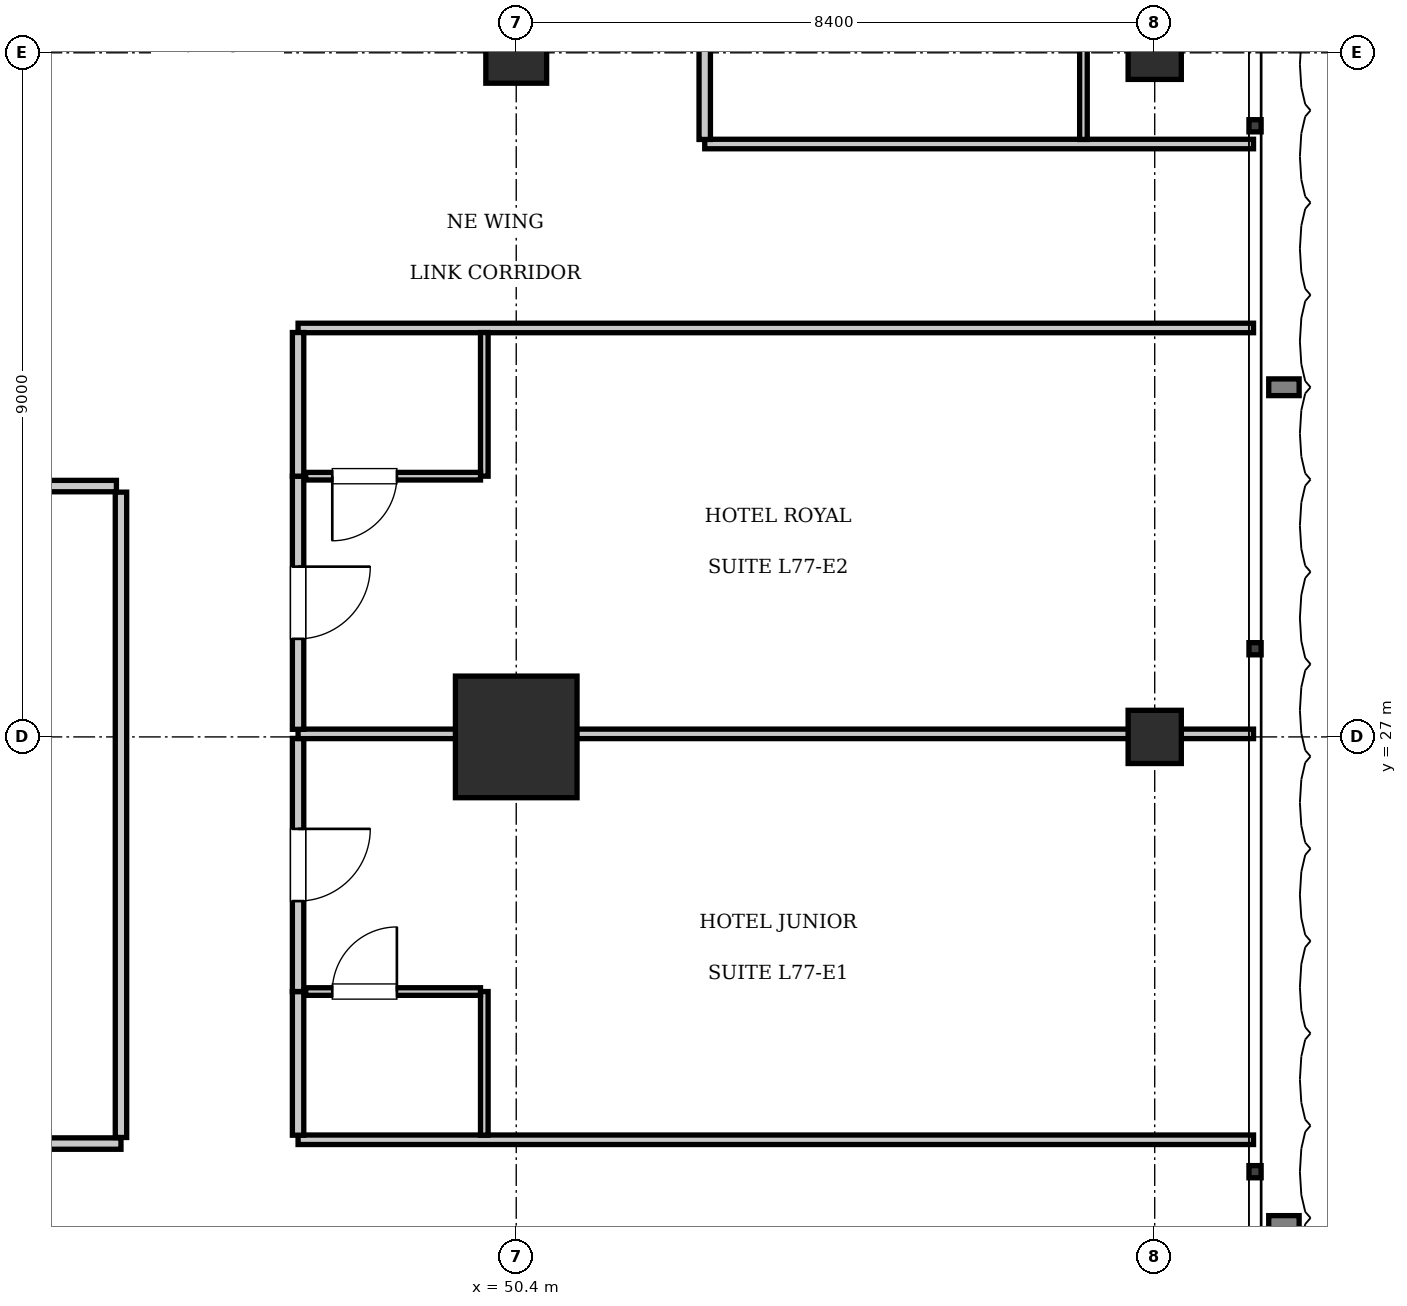
"""IFC4 building model, lengths in metres.
Left out: names, types, materials, properties, quantities, classifications, styles, units other than length and angle.
Written with IfcOpenShell. Run it as: python <this file> out.ifc"""

import sys

from ifc_helpers import new_model, si_unit, direction, frame, frame_2d, origin, origin_2d, place, context, subcontext, project, spatial, rectangle, extrude, element, fill, save


model = new_model("IFC4")
c1 = context("Model", 3, precision=1e-05, world=origin(), true_north=direction((0.0, 1.0)))
c2 = subcontext(c1, "Body", "Model", "MODEL_VIEW")
j1 = project(units=[si_unit("LENGTHUNIT", "METRE"), si_unit("PLANEANGLEUNIT", "RADIAN")], contexts=[c1])
p1 = place(None, origin())
s1 = spatial("IfcSite", under=j1, at=p1, CompositionType="ELEMENT")
p2 = place(p1, origin())
s2 = spatial("IfcBuilding", under=s1, at=p2, CompositionType="ELEMENT")
p3 = place(p2, frame((0.0, 0.0, 312.55)))
s3 = spatial("IfcBuildingStorey", under=s2, at=p3, CompositionType="ELEMENT", Elevation=312.55)
p4 = place(p3, frame((50.4, 27.0, 0.0), z_axis=(0.0, 0.0, 1.0), x_axis=(1.0, 0.0, 0.0)))
e1 = element("IfcColumn", 1, at=p4, inside=s3, PredefinedType="COLUMN", context=c2, shape_type="SweptSolid", body=[
    extrude(rectangle(XDim=1.6, YDim=1.6, at=origin_2d()), origin(), (0.0, 0.0, 1.0), 3.85),
])
p5 = place(p3, frame((50.4, 36.0, 0.0), z_axis=(0.0, 0.0, 1.0), x_axis=(1.0, 0.0, 0.0)))
e2 = element("IfcColumn", 2, at=p5, inside=s3, PredefinedType="COLUMN", context=c2, shape_type="SweptSolid", body=[
    extrude(rectangle(XDim=0.8, YDim=0.8, at=origin_2d()), origin(), (0.0, 0.0, 1.0), 3.85),
])
for number, where, z_axis, x_axis in (
    (3, (58.8, 27.0, 0.0), (0.0, 0.0, 1.0), (1.0, 0.0, 0.0)),
    (4, (58.8, 36.0, 0.0), (0.0, 0.0, 1.0), (1.0, 0.0, 0.0)),
):
    element("IfcColumn", number, at=place(p3, frame(where, z_axis=z_axis, x_axis=x_axis)), inside=s3, PredefinedType="COLUMN", context=c2, shape_type="SweptSolid", body=[
        extrude(rectangle(XDim=0.7, YDim=0.7, at=origin_2d()), origin(), (0.0, 0.0, 1.0), 3.85),
    ])
p6 = place(p3, frame((30.45, 21.65, 0.0), z_axis=(0.0, 0.0, 1.0), x_axis=(1.0, 0.0, 0.0)))
e5 = element("IfcWall", 5, at=p6, inside=s3, PredefinedType="PARTITIONING", context=c2, shape_type="SweptSolid", body=[
    extrude(rectangle(XDim=14.75, YDim=0.15, at=frame_2d((7.375, 0.0))), origin(), (0.0, 0.0, 1.0), 3.55),
])
p7 = place(p3, frame((45.2, 21.73, 0.0), z_axis=(0.0, 0.0, 1.0), x_axis=(0.0, 1.0, 0.0)))
e6 = element("IfcWall", 6, at=p7, inside=s3, PredefinedType="PARTITIONING", context=c2, shape_type="SweptSolid", body=[
    extrude(rectangle(XDim=8.49, YDim=0.15, at=frame_2d((4.245, 0.0))), origin(), (0.0, 0.0, 1.0), 3.55),
])
p8 = place(p3, frame((40.215, 30.3, 0.0), z_axis=(0.0, 0.0, 1.0), x_axis=(1.0, 0.0, 0.0)))
e7 = element("IfcWall", 7, at=p8, inside=s3, PredefinedType="PARTITIONING", context=c2, shape_type="SweptSolid", body=[
    extrude(rectangle(XDim=4.925, YDim=0.15, at=frame_2d((2.462, 0.0))), origin(), (0.0, 0.0, 1.0), 3.55),
])
p9 = place(p8, frame((2.012, 0.0, 0.0)))
e8 = element("IfcOpeningElement", 8, at=p9, cuts=e7, PredefinedType="OPENING", context=c2, shape_type="SweptSolid", body=[
    extrude(rectangle(XDim=0.9, YDim=2.1, at=frame_2d((0.45, 1.05))), frame((0.0, 0.085, 0.0), z_axis=(0.0, -1.0, 0.0), x_axis=(1.0, 0.0, 0.0)), (0.0, 0.0, 1.0), 0.17),
])
for number, where, z_axis, x_axis in (
    (9, (47.53, 21.7, 0.0), (0.0, 0.0, 1.0), (1.0, 0.0, 0.0)),
    (10, (47.53, 32.38, 0.0), (0.0, 0.0, 1.0), (1.0, 0.0, 0.0)),
):
    element("IfcWall", number, at=place(p3, frame(where, z_axis=z_axis, x_axis=x_axis)), inside=s3, PredefinedType="PARTITIONING", context=c2, shape_type="SweptSolid", body=[
        extrude(rectangle(XDim=12.57, YDim=0.125, at=frame_2d((6.285, 0.0))), origin(), (0.0, 0.0, 1.0), 3.55),
    ])
p10 = place(p3, frame((47.53, 21.76, 0.0), z_axis=(0.0, 0.0, 1.0), x_axis=(0.0, 1.0, 0.0)))
e11 = element("IfcWall", 11, at=p10, inside=s3, PredefinedType="PARTITIONING", context=c2, shape_type="SweptSolid", body=[
    extrude(rectangle(XDim=1.89, YDim=0.15, at=frame_2d((0.945, 0.0))), origin(), (0.0, 0.0, 1.0), 3.55),
])
p11 = place(p3, frame((47.53, 23.65, 0.0), z_axis=(0.0, 0.0, 1.0), x_axis=(0.0, 1.0, 0.0)))
e12 = element("IfcWall", 12, at=p11, inside=s3, PredefinedType="PARTITIONING", context=c2, shape_type="SweptSolid", body=[
    extrude(rectangle(XDim=3.33, YDim=0.15, at=frame_2d((1.665, 0.0))), origin(), (0.0, 0.0, 1.0), 3.55),
])
p12 = place(p11, frame((1.19, 0.0, 0.0)))
e13 = element("IfcOpeningElement", 13, at=p12, cuts=e12, PredefinedType="OPENING", context=c2, shape_type="SweptSolid", body=[
    extrude(rectangle(XDim=0.95, YDim=2.15, at=frame_2d((0.475, 1.075))), frame((0.0, 0.085, 0.0), z_axis=(0.0, -1.0, 0.0), x_axis=(1.0, 0.0, 0.0)), (0.0, 0.0, 1.0), 0.17),
])
p13 = place(p3, frame((49.98, 21.76, 0.0), z_axis=(0.0, 0.0, 1.0), x_axis=(0.0, 1.0, 0.0)))
e14 = element("IfcWall", 14, at=p13, inside=s3, PredefinedType="PARTITIONING", context=c2, shape_type="SweptSolid", body=[
    extrude(rectangle(XDim=1.89, YDim=0.1, at=frame_2d((0.945, 0.0))), origin(), (0.0, 0.0, 1.0), 3.55),
])
p14 = place(p3, frame((47.63, 23.65, 0.0), z_axis=(0.0, 0.0, 1.0), x_axis=(1.0, 0.0, 0.0)))
e15 = element("IfcWall", 15, at=p14, inside=s3, PredefinedType="PARTITIONING", context=c2, shape_type="SweptSolid", body=[
    extrude(rectangle(XDim=2.3, YDim=0.1, at=frame_2d((1.15, 0.0))), origin(), (0.0, 0.0, 1.0), 3.55),
])
p15 = place(p14, frame((0.35, 0.0, 0.0)))
e16 = element("IfcOpeningElement", 16, at=p15, cuts=e15, PredefinedType="OPENING", context=c2, shape_type="SweptSolid", body=[
    extrude(rectangle(XDim=0.85, YDim=2.1, at=frame_2d((0.425, 1.05))), frame((0.0, 0.06, 0.0), z_axis=(0.0, -1.0, 0.0), x_axis=(1.0, 0.0, 0.0)), (0.0, 0.0, 1.0), 0.12),
])
p16 = place(p3, frame((47.53, 27.04, 0.0), z_axis=(0.0, 0.0, 1.0), x_axis=(1.0, 0.0, 0.0)))
e17 = element("IfcWall", 17, at=p16, inside=s3, PredefinedType="PARTITIONING", context=c2, shape_type="SweptSolid", body=[
    extrude(rectangle(XDim=12.57, YDim=0.125, at=frame_2d((6.285, 0.0))), origin(), (0.0, 0.0, 1.0), 2.35),
])
p17 = place(p3, frame((47.53, 27.1, 0.0), z_axis=(0.0, 0.0, 1.0), x_axis=(0.0, 1.0, 0.0)))
e18 = element("IfcWall", 18, at=p17, inside=s3, PredefinedType="PARTITIONING", context=c2, shape_type="SweptSolid", body=[
    extrude(rectangle(XDim=3.33, YDim=0.15, at=frame_2d((1.665, 0.0))), origin(), (0.0, 0.0, 1.0), 3.55),
])
p18 = place(p17, frame((1.19, 0.0, 0.0)))
e19 = element("IfcOpeningElement", 19, at=p18, cuts=e18, PredefinedType="OPENING", context=c2, shape_type="SweptSolid", body=[
    extrude(rectangle(XDim=0.95, YDim=2.15, at=frame_2d((0.475, 1.075))), frame((0.0, 0.085, 0.0), z_axis=(0.0, -1.0, 0.0), x_axis=(1.0, 0.0, 0.0)), (0.0, 0.0, 1.0), 0.17),
])
p19 = place(p3, frame((47.53, 30.43, 0.0), z_axis=(0.0, 0.0, 1.0), x_axis=(0.0, 1.0, 0.0)))
e20 = element("IfcWall", 20, at=p19, inside=s3, PredefinedType="PARTITIONING", context=c2, shape_type="SweptSolid", body=[
    extrude(rectangle(XDim=1.89, YDim=0.15, at=frame_2d((0.945, 0.0))), origin(), (0.0, 0.0, 1.0), 3.55),
])
p20 = place(p3, frame((49.98, 30.43, 0.0), z_axis=(0.0, 0.0, 1.0), x_axis=(0.0, 1.0, 0.0)))
e21 = element("IfcWall", 21, at=p20, inside=s3, PredefinedType="PARTITIONING", context=c2, shape_type="SweptSolid", body=[
    extrude(rectangle(XDim=1.89, YDim=0.1, at=frame_2d((0.945, 0.0))), origin(), (0.0, 0.0, 1.0), 3.55),
])
p21 = place(p3, frame((47.63, 30.43, 0.0), z_axis=(0.0, 0.0, 1.0), x_axis=(1.0, 0.0, 0.0)))
e22 = element("IfcWall", 22, at=p21, inside=s3, PredefinedType="PARTITIONING", context=c2, shape_type="SweptSolid", body=[
    extrude(rectangle(XDim=2.3, YDim=0.1, at=frame_2d((1.15, 0.0))), origin(), (0.0, 0.0, 1.0), 3.55),
])
p22 = place(p21, frame((0.35, 0.0, 0.0)))
e23 = element("IfcOpeningElement", 23, at=p22, cuts=e22, PredefinedType="OPENING", context=c2, shape_type="SweptSolid", body=[
    extrude(rectangle(XDim=0.85, YDim=2.1, at=frame_2d((0.425, 1.05))), frame((0.0, 0.06, 0.0), z_axis=(0.0, -1.0, 0.0), x_axis=(1.0, 0.0, 0.0)), (0.0, 0.0, 1.0), 0.12),
])
p23 = place(p3, frame((52.88, 34.8, 0.0), z_axis=(0.0, 0.0, 1.0), x_axis=(1.0, 0.0, 0.0)))
e24 = element("IfcWall", 24, at=p23, inside=s3, PredefinedType="PARTITIONING", context=c2, shape_type="SweptSolid", body=[
    extrude(rectangle(XDim=7.22, YDim=0.125, at=frame_2d((3.61, 0.0))), origin(), (0.0, 0.0, 1.0), 3.55),
])
p24 = place(p3, frame((52.88, 34.86, 0.0), z_axis=(0.0, 0.0, 1.0), x_axis=(0.0, 1.0, 0.0)))
e25 = element("IfcWall", 25, at=p24, inside=s3, PredefinedType="PARTITIONING", context=c2, shape_type="SweptSolid", body=[
    extrude(rectangle(XDim=11.527, YDim=0.15, at=frame_2d((5.764, 0.0))), origin(), (0.0, 0.0, 1.0), 3.55),
])
p25 = place(p24, frame((5.289, 0.0, 0.0)))
e26 = element("IfcOpeningElement", 26, at=p25, cuts=e25, PredefinedType="OPENING", context=c2, shape_type="SweptSolid", body=[
    extrude(rectangle(XDim=0.95, YDim=2.15, at=frame_2d((0.475, 1.075))), frame((0.0, 0.085, 0.0), z_axis=(0.0, -1.0, 0.0), x_axis=(1.0, 0.0, 0.0)), (0.0, 0.0, 1.0), 0.17),
])
p26 = place(p3, frame((57.862, 34.86, 0.0), z_axis=(0.0, 0.0, 1.0), x_axis=(0.0, 1.0, 0.0)))
e27 = element("IfcWall", 27, at=p26, inside=s3, PredefinedType="PARTITIONING", context=c2, shape_type="SweptSolid", body=[
    extrude(rectangle(XDim=13.938, YDim=0.1, at=frame_2d((6.969, 0.0))), origin(), (0.0, 0.0, 1.0), 3.55),
])
p27 = place(p26, frame((6.519, 0.0, 0.0)))
e28 = element("IfcOpeningElement", 28, at=p27, cuts=e27, PredefinedType="OPENING", context=c2, shape_type="SweptSolid", body=[
    extrude(rectangle(XDim=0.9, YDim=2.1, at=frame_2d((0.45, 1.05))), frame((0.0, 0.06, 0.0), z_axis=(0.0, -1.0, 0.0), x_axis=(1.0, 0.0, 0.0)), (0.0, 0.0, 1.0), 0.12),
])
p28 = place(p15, origin())
e29 = element("IfcDoor", 29, at=p28, inside=s3, OperationType="SINGLE_SWING_RIGHT", PredefinedType="DOOR", context=c2, shape_type="SweptSolid", body=[
    extrude(rectangle(XDim=0.85, YDim=2.1, at=frame_2d((0.425, 1.05))), frame((0.0, 0.025, 0.0), z_axis=(0.0, -1.0, 0.0), x_axis=(1.0, 0.0, 0.0)), (0.0, 0.0, 1.0), 0.05),
])
fill(e16, e29)
p29 = place(p12, frame((0.95, 0.0, 0.0), z_axis=(0.0, 0.0, 1.0), x_axis=(-1.0, 0.0, 0.0)))
e30 = element("IfcDoor", 30, at=p29, inside=s3, OperationType="SINGLE_SWING_LEFT", PredefinedType="DOOR", context=c2, shape_type="SweptSolid", body=[
    extrude(rectangle(XDim=0.95, YDim=2.15, at=frame_2d((0.475, 1.075))), frame((0.0, 0.025, 0.0), z_axis=(0.0, -1.0, 0.0), x_axis=(1.0, 0.0, 0.0)), (0.0, 0.0, 1.0), 0.05),
])
fill(e13, e30)
p30 = place(p22, frame((0.85, 0.0, 0.0), z_axis=(0.0, 0.0, 1.0), x_axis=(-1.0, 0.0, 0.0)))
e31 = element("IfcDoor", 31, at=p30, inside=s3, OperationType="SINGLE_SWING_RIGHT", PredefinedType="DOOR", context=c2, shape_type="SweptSolid", body=[
    extrude(rectangle(XDim=0.85, YDim=2.1, at=frame_2d((0.425, 1.05))), frame((0.0, 0.025, 0.0), z_axis=(0.0, -1.0, 0.0), x_axis=(1.0, 0.0, 0.0)), (0.0, 0.0, 1.0), 0.05),
])
fill(e23, e31)
p31 = place(p18, frame((0.95, 0.0, 0.0), z_axis=(0.0, 0.0, 1.0), x_axis=(-1.0, 0.0, 0.0)))
e32 = element("IfcDoor", 32, at=p31, inside=s3, OperationType="SINGLE_SWING_LEFT", PredefinedType="DOOR", context=c2, shape_type="SweptSolid", body=[
    extrude(rectangle(XDim=0.95, YDim=2.15, at=frame_2d((0.475, 1.075))), frame((0.0, 0.025, 0.0), z_axis=(0.0, -1.0, 0.0), x_axis=(1.0, 0.0, 0.0)), (0.0, 0.0, 1.0), 0.05),
])
fill(e19, e32)
save(model, sys.argv[1])
